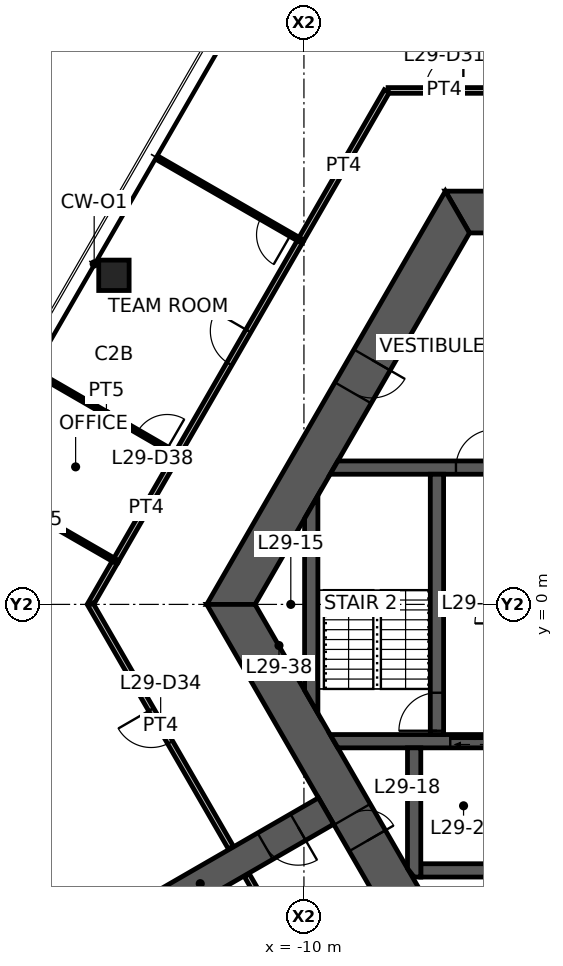
"""IFC4 building model, lengths in metres.
Left out: names, types, materials, properties, quantities, classifications, styles, units other than length and angle.
Written with IfcOpenShell. Run it as: python <this file> out.ifc"""

import sys

from ifc_helpers import new_model, si_unit, direction, frame, frame_2d, origin, origin_2d, place, context, subcontext, project, spatial, polyline, rectangle, hollow_rectangle, outline, extrude, element, fill, save


model = new_model("IFC4")
c1 = context("Model", 3, precision=1e-05, world=origin(), true_north=direction((0.0, 1.0)))
c2 = subcontext(c1, "Body", "Model", "MODEL_VIEW")
j1 = project(units=[si_unit("LENGTHUNIT", "METRE"), si_unit("PLANEANGLEUNIT", "RADIAN")], contexts=[c1])
p1 = place(None, origin())
s1 = spatial("IfcSite", under=j1, at=p1, CompositionType="ELEMENT")
p2 = place(p1, origin())
s2 = spatial("IfcBuilding", under=s1, at=p2, CompositionType="ELEMENT")
p3 = place(p2, frame((0.0, 0.0, 115.8)))
s3 = spatial("IfcBuildingStorey", under=s2, at=p3, CompositionType="ELEMENT", Elevation=115.8)
p4 = place(p3, frame((-15.0, 8.66, 0.0), z_axis=(0.0, 0.0, 1.0), x_axis=(1.0, 0.0, 0.0)))
e1 = element("IfcColumn", 1, at=p4, inside=s3, PredefinedType="COLUMN", context=c2, shape_type="SweptSolid", body=[
    extrude(hollow_rectangle(XDim=0.8, YDim=0.8, WallThickness=0.045, at=origin_2d()), origin(), (0.0, 0.0, 1.0), 3.9),
])
p5 = place(p3, frame((5.961, 10.325, 0.0), z_axis=(0.0, 0.0, 1.0), x_axis=(-1.0, 0.0, 0.0)))
e2 = element("IfcWall", 2, at=p5, inside=s3, PredefinedType="SHEAR", context=c2, shape_type="SweptSolid", body=[
    extrude(outline(polyline([(-0.318, -0.55), (4.599, -0.55), (5.499, -0.55), (6.424, -0.55), (7.323, -0.55), (12.24, -0.55), (11.605, 0.55), (7.323, 0.55), (6.424, 0.55), (5.499, 0.55), (4.599, 0.55), (0.318, 0.55), (-0.318, -0.55)])), origin(), (0.0, 0.0, 1.0), 3.9),
])
p6 = place(p5, frame((6.424, 0.0, 0.0)))
e3 = element("IfcOpeningElement", 3, at=p6, cuts=e2, PredefinedType="OPENING", context=c2, shape_type="SweptSolid", body=[
    extrude(rectangle(XDim=0.9, YDim=2.1, at=frame_2d((0.45, 1.05))), frame((0.0, 0.56, 0.0), z_axis=(0.0, -1.0, 0.0), x_axis=(1.0, 0.0, 0.0)), (0.0, 0.0, 1.0), 1.12),
])
p7 = place(p5, frame((4.599, 0.0, 0.0)))
e4 = element("IfcOpeningElement", 4, at=p7, cuts=e2, PredefinedType="OPENING", context=c2, shape_type="SweptSolid", body=[
    extrude(rectangle(XDim=0.9, YDim=2.1, at=frame_2d((0.45, 1.05))), frame((0.0, 0.56, 0.0), z_axis=(0.0, -1.0, 0.0), x_axis=(1.0, 0.0, 0.0)), (0.0, 0.0, 1.0), 1.12),
])
p8 = place(p3, frame((-5.961, 10.325, 0.0), z_axis=(0.0, 0.0, 1.0), x_axis=(-0.500004296715, -0.866022923061, 0.0)))
e5 = element("IfcWall", 5, at=p8, inside=s3, PredefinedType="SHEAR", context=c2, shape_type="SweptSolid", body=[
    extrude(outline(polyline([(-0.318, -0.55), (4.494, -0.55), (5.494, -0.55), (12.24, -0.55), (11.605, 0.55), (5.494, 0.55), (4.494, 0.55), (0.318, 0.55), (-0.318, -0.55)])), origin(), (0.0, 0.0, 1.0), 3.9),
])
p9 = place(p8, frame((4.494, 0.0, 0.0)))
e6 = element("IfcOpeningElement", 6, at=p9, cuts=e5, PredefinedType="OPENING", context=c2, shape_type="SweptSolid", body=[
    extrude(rectangle(XDim=1.0, YDim=2.1, at=frame_2d((0.5, 1.05))), frame((0.0, 0.56, 0.0), z_axis=(0.0, -1.0, 0.0), x_axis=(1.0, 0.0, 0.0)), (0.0, 0.0, 1.0), 1.12),
])
p10 = place(p3, frame((-11.922, 0.0, 0.0), z_axis=(0.0, 0.0, 1.0), x_axis=(0.500004296715, -0.866022923061, 0.0)))
e7 = element("IfcWall", 7, at=p10, inside=s3, PredefinedType="SHEAR", context=c2, shape_type="SweptSolid", body=[
    extrude(outline(polyline([(-0.318, -0.55), (6.381, -0.55), (7.181, -0.55), (12.24, -0.55), (11.605, 0.55), (7.181, 0.55), (6.381, 0.55), (0.318, 0.55), (-0.318, -0.55)])), origin(), (0.0, 0.0, 1.0), 3.9),
])
p11 = place(p10, frame((6.381, 0.0, 0.0)))
e8 = element("IfcOpeningElement", 8, at=p11, cuts=e7, PredefinedType="OPENING", context=c2, shape_type="SweptSolid", body=[
    extrude(rectangle(XDim=0.8, YDim=2.1, at=frame_2d((0.4, 1.05))), frame((0.0, 0.56, 0.0), z_axis=(0.0, -1.0, 0.0), x_axis=(1.0, 0.0, 0.0)), (0.0, 0.0, 1.0), 1.12),
])
p12 = place(p3, frame((-9.418, -5.438, 0.0), z_axis=(0.0, 0.0, 1.0), x_axis=(-0.866029782078, -0.499992416496, 0.0)))
e9 = element("IfcWall", 9, at=p12, inside=s3, PredefinedType="SHEAR", context=c2, shape_type="SweptSolid", body=[
    extrude(rectangle(XDim=7.646, YDim=0.8, at=frame_2d((3.823, 0.0))), origin(), (0.0, 0.0, 1.0), 3.9),
])
p13 = place(p12, frame((0.85, 0.0, 0.0)))
e10 = element("IfcOpeningElement", 10, at=p13, cuts=e9, PredefinedType="OPENING", context=c2, shape_type="SweptSolid", body=[
    extrude(rectangle(XDim=1.0, YDim=2.1, at=frame_2d((0.5, 1.05))), frame((0.0, 0.41, 0.0), z_axis=(0.0, -1.0, 0.0), x_axis=(1.0, 0.0, 0.0)), (0.0, 0.0, 1.0), 0.82),
])
p14 = place(p3, frame((-9.209, 3.6, 0.0), z_axis=(0.0, 0.0, 1.0), x_axis=(1.0, 0.0, 0.0)))
e11 = element("IfcWall", 11, at=p14, inside=s3, PredefinedType="SHEAR", context=c2, shape_type="SweptSolid", body=[
    extrude(outline(polyline([(-0.101, -0.175), (3.209, -0.175), (4.209, -0.175), (5.609, -0.175), (6.709, -0.175), (7.784, -0.175), (7.784, 0.175), (6.709, 0.175), (5.609, 0.175), (4.209, 0.175), (3.209, 0.175), (0.101, 0.175), (-0.101, -0.175)])), origin(), (0.0, 0.0, 1.0), 3.9),
])
p15 = place(p14, frame((3.209, 0.0, 0.0)))
e12 = element("IfcOpeningElement", 12, at=p15, cuts=e11, PredefinedType="OPENING", context=c2, shape_type="SweptSolid", body=[
    extrude(rectangle(XDim=1.0, YDim=2.1, at=frame_2d((0.5, 1.05))), frame((0.0, 0.185, 0.0), z_axis=(0.0, -1.0, 0.0), x_axis=(1.0, 0.0, 0.0)), (0.0, 0.0, 1.0), 0.37),
])
p16 = place(p14, frame((5.609, 0.0, 0.0)))
e13 = element("IfcOpeningElement", 13, at=p16, cuts=e11, PredefinedType="OPENING", context=c2, shape_type="SweptSolid", body=[
    extrude(rectangle(XDim=1.1, YDim=2.1, at=frame_2d((0.55, 1.05))), frame((0.0, 0.185, 0.0), z_axis=(0.0, -1.0, 0.0), x_axis=(1.0, 0.0, 0.0)), (0.0, 0.0, 1.0), 0.37),
])
p17 = place(p3, frame((-9.209, -3.6, 0.0), z_axis=(0.0, 0.0, 1.0), x_axis=(1.0, 0.0, 0.0)))
e14 = element("IfcWall", 14, at=p17, inside=s3, PredefinedType="SHEAR", context=c2, shape_type="SweptSolid", body=[
    extrude(outline(polyline([(0.101, -0.175), (3.059, -0.175), (4.359, -0.175), (5.609, -0.175), (6.709, -0.175), (7.784, -0.175), (7.784, 0.175), (6.709, 0.175), (5.609, 0.175), (4.359, 0.175), (3.059, 0.175), (-0.101, 0.175), (0.101, -0.175)])), origin(), (0.0, 0.0, 1.0), 3.9),
])
p18 = place(p17, frame((5.609, 0.0, 0.0)))
e15 = element("IfcOpeningElement", 15, at=p18, cuts=e14, PredefinedType="OPENING", context=c2, shape_type="SweptSolid", body=[
    extrude(rectangle(XDim=1.1, YDim=2.1, at=frame_2d((0.55, 1.05))), frame((0.0, 0.185, 0.0), z_axis=(0.0, -1.0, 0.0), x_axis=(1.0, 0.0, 0.0)), (0.0, 0.0, 1.0), 0.37),
])
p19 = place(p17, frame((3.059, 0.0, 0.0)))
e16 = element("IfcOpeningElement", 16, at=p19, cuts=e14, PredefinedType="OPENING", context=c2, shape_type="SweptSolid", body=[
    extrude(rectangle(XDim=1.3, YDim=2.1, at=frame_2d((0.65, 1.05))), frame((0.0, 0.185, 0.0), z_axis=(0.0, -1.0, 0.0), x_axis=(1.0, 0.0, 0.0)), (0.0, 0.0, 1.0), 0.37),
])
p20 = place(p3, frame((-6.5, -3.425, 0.0), z_axis=(0.0, 0.0, 1.0), x_axis=(0.0, 1.0, 0.0)))
e17 = element("IfcWall", 17, at=p20, inside=s3, PredefinedType="SHEAR", context=c2, shape_type="SweptSolid", body=[
    extrude(rectangle(XDim=6.85, YDim=0.35, at=frame_2d((3.425, 0.0))), origin(), (0.0, 0.0, 1.0), 3.9),
])
p21 = place(p20, frame((0.1, 0.0, 0.0)))
e18 = element("IfcOpeningElement", 18, at=p21, cuts=e17, PredefinedType="OPENING", context=c2, shape_type="SweptSolid", body=[
    extrude(rectangle(XDim=1.0, YDim=2.1, at=frame_2d((0.5, 1.05))), frame((0.0, 0.185, 0.0), z_axis=(0.0, -1.0, 0.0), x_axis=(1.0, 0.0, 0.0)), (0.0, 0.0, 1.0), 0.37),
])
p22 = place(p3, frame((-6.925, -7.0, 0.0), z_axis=(0.0, 0.0, 1.0), x_axis=(1.0, 0.0, 0.0)))
e19 = element("IfcWall", 19, at=p22, inside=s3, PredefinedType="SHEAR", context=c2, shape_type="SweptSolid", body=[
    extrude(rectangle(XDim=2.25, YDim=0.35, at=frame_2d((1.125, 0.0))), origin(), (0.0, 0.0, 1.0), 3.9),
])
p23 = place(p3, frame((-7.1, -3.775, 0.0), z_axis=(0.0, 0.0, 1.0), x_axis=(0.0, -1.0, 0.0)))
e20 = element("IfcWall", 20, at=p23, inside=s3, PredefinedType="SHEAR", context=c2, shape_type="SweptSolid", body=[
    extrude(outline(polyline([(0.0, -0.175), (3.175, -0.175), (3.4, 0.0), (3.4, 0.175), (0.0, 0.175), (0.0, -0.175)])), origin(), (0.0, 0.0, 1.0), 3.9),
])
p24 = place(p3, frame((-9.808, -2.562, 0.0), z_axis=(0.0, 0.0, 1.0), x_axis=(0.0, 1.0, 0.0)))
e21 = element("IfcWall", 21, at=p24, inside=s3, PredefinedType="SHEAR", context=c2, shape_type="SweptSolid", body=[
    extrude(outline(polyline([(-0.303, -0.175), (5.428, -0.175), (4.821, 0.175), (0.303, 0.175), (-0.303, -0.175)])), origin(), (0.0, 0.0, 1.0), 3.9),
])
p25 = place(p3, frame((-7.786, 13.525, 0.0), z_axis=(0.0, 0.0, 1.0), x_axis=(1.0, 0.0, 0.0)))
e22 = element("IfcWall", 22, at=p25, inside=s3, PredefinedType="PARTITIONING", context=c2, shape_type="SweptSolid", body=[
    extrude(rectangle(XDim=2.961, YDim=0.15, at=frame_2d((1.48, 0.0))), origin(), (0.0, 0.0, 1.0), 2.95),
])
p26 = place(p25, frame((0.981, 0.0, 0.0)))
e23 = element("IfcOpeningElement", 23, at=p26, cuts=e22, PredefinedType="OPENING", context=c2, shape_type="SweptSolid", body=[
    extrude(rectangle(XDim=1.0, YDim=2.1, at=frame_2d((0.5, 1.05))), frame((0.0, 0.085, 0.0), z_axis=(0.0, -1.0, 0.0), x_axis=(1.0, 0.0, 0.0)), (0.0, 0.0, 1.0), 0.17),
])
p27 = place(p3, frame((-10.092, 9.57, 0.0), z_axis=(0.0, 0.0, 1.0), x_axis=(0.499987549055, 0.866032592222, 0.0)))
e24 = element("IfcWall", 24, at=p27, inside=s3, PredefinedType="PARTITIONING", context=c2, shape_type="SweptSolid", body=[
    extrude(rectangle(XDim=4.544, YDim=0.15, at=frame_2d((2.272, 0.0))), origin(), (0.0, 0.0, 1.0), 2.95),
])
p28 = place(p3, frame((-14.962, 1.135, 0.0), z_axis=(0.0, 0.0, 1.0), x_axis=(0.500001520505, 0.866024525919, 0.0)))
e25 = element("IfcWall", 25, at=p28, inside=s3, PredefinedType="PARTITIONING", context=c2, shape_type="SweptSolid", body=[
    extrude(rectangle(XDim=3.256, YDim=0.15, at=frame_2d((1.628, 0.0))), origin(), (0.0, 0.0, 1.0), 2.95),
])
p29 = place(p3, frame((-15.617, 0.0, 0.0), z_axis=(0.0, 0.0, 1.0), x_axis=(0.499898558967, 0.866083962871, 0.0)))
e26 = element("IfcWall", 26, at=p29, inside=s3, PredefinedType="PARTITIONING", context=c2, shape_type="SweptSolid", body=[
    extrude(rectangle(XDim=1.32, YDim=0.15, at=frame_2d((0.66, 0.0))), origin(), (0.0, 0.0, 1.0), 2.95),
])
p30 = place(p3, frame((-11.923, -6.399, 0.0), z_axis=(0.0, 0.0, 1.0), x_axis=(-0.499980837837, 0.866036466782, 0.0)))
e27 = element("IfcWall", 27, at=p30, inside=s3, PredefinedType="PARTITIONING", context=c2, shape_type="SweptSolid", body=[
    extrude(rectangle(XDim=7.388, YDim=0.15, at=frame_2d((3.694, 0.0))), origin(), (0.0, 0.0, 1.0), 2.95),
])
p31 = place(p30, frame((3.194, 0.0, 0.0)))
e28 = element("IfcOpeningElement", 28, at=p31, cuts=e27, PredefinedType="OPENING", context=c2, shape_type="SweptSolid", body=[
    extrude(rectangle(XDim=1.0, YDim=2.1, at=frame_2d((0.5, 1.05))), frame((0.0, 0.085, 0.0), z_axis=(0.0, -1.0, 0.0), x_axis=(1.0, 0.0, 0.0)), (0.0, 0.0, 1.0), 0.17),
])
p32 = place(p3, frame((-13.338, 3.947, 0.0), z_axis=(0.0, 0.0, 1.0), x_axis=(0.49998791073, 0.866032383415, 0.0)))
e29 = element("IfcWall", 29, at=p32, inside=s3, PredefinedType="PARTITIONING", context=c2, shape_type="SweptSolid", body=[
    extrude(rectangle(XDim=6.502, YDim=0.15, at=frame_2d((3.251, 0.0))), origin(), (0.0, 0.0, 1.0), 2.95),
])
p33 = place(p32, frame((2.751, 0.0, 0.0)))
e30 = element("IfcOpeningElement", 30, at=p33, cuts=e29, PredefinedType="OPENING", context=c2, shape_type="SweptSolid", body=[
    extrude(rectangle(XDim=1.0, YDim=2.1, at=frame_2d((0.5, 1.05))), frame((0.0, 0.085, 0.0), z_axis=(0.0, -1.0, 0.0), x_axis=(1.0, 0.0, 0.0)), (0.0, 0.0, 1.0), 0.17),
])
p34 = place(p3, frame((-10.088, 9.578, 0.0), z_axis=(0.0, 0.0, 1.0), x_axis=(-0.866555067673, 0.499081470994, 0.0)))
e31 = element("IfcWall", 31, at=p34, inside=s3, PredefinedType="PARTITIONING", context=c2, shape_type="SweptSolid", body=[
    extrude(rectangle(XDim=4.321, YDim=0.1, at=frame_2d((2.16, 0.0))), origin(), (0.0, 0.0, 1.0), 2.95),
])
p35 = place(p34, frame((0.3, 0.0, 0.0)))
e32 = element("IfcOpeningElement", 32, at=p35, cuts=e31, PredefinedType="OPENING", context=c2, shape_type="SweptSolid", body=[
    extrude(rectangle(XDim=0.9, YDim=2.1, at=frame_2d((0.45, 1.05))), frame((0.0, 0.06, 0.0), z_axis=(0.0, -1.0, 0.0), x_axis=(1.0, 0.0, 0.0)), (0.0, 0.0, 1.0), 0.12),
])
p36 = place(p3, frame((-14.957, 1.143, 0.0), z_axis=(0.0, 0.0, 1.0), x_axis=(-0.86652666665, 0.499130780441, 0.0)))
e33 = element("IfcWall", 33, at=p36, inside=s3, PredefinedType="PARTITIONING", context=c2, shape_type="SweptSolid", body=[
    extrude(rectangle(XDim=4.275, YDim=0.1, at=frame_2d((2.138, 0.0))), origin(), (0.0, 0.0, 1.0), 2.95),
])
p37 = place(p3, frame((-17.056, 6.099, 0.0), z_axis=(0.0, 0.0, 1.0), x_axis=(0.865505397626, -0.500899597405, 0.0)))
e34 = element("IfcWall", 34, at=p37, inside=s3, PredefinedType="PARTITIONING", context=c2, shape_type="SweptSolid", body=[
    extrude(rectangle(XDim=4.295, YDim=0.1, at=frame_2d((2.148, 0.0))), origin(), (0.0, 0.0, 1.0), 2.95),
])
p38 = place(p37, frame((3.095, 0.0, 0.0)))
e35 = element("IfcOpeningElement", 35, at=p38, cuts=e34, PredefinedType="OPENING", context=c2, shape_type="SweptSolid", body=[
    extrude(rectangle(XDim=0.9, YDim=2.1, at=frame_2d((0.45, 1.05))), frame((0.0, 0.06, 0.0), z_axis=(0.0, -1.0, 0.0), x_axis=(1.0, 0.0, 0.0)), (0.0, 0.0, 1.0), 0.12),
])
p39 = place(p3, frame((-10.911, -8.152, 0.0), z_axis=(0.0, 0.0, 1.0), x_axis=(-0.499841408252, 0.866116947413, 0.0)))
e36 = element("IfcWall", 36, at=p39, inside=s3, PredefinedType="PARTITIONING", context=c2, shape_type="SweptSolid", body=[
    extrude(rectangle(XDim=1.185, YDim=0.15, at=frame_2d((0.592, 0.0))), origin(), (0.0, 0.0, 1.0), 2.95),
])
p40 = place(p11, origin())
e37 = element("IfcDoor", 37, at=p40, inside=s3, OperationType="SINGLE_SWING_RIGHT", PredefinedType="DOOR", context=c2, shape_type="SweptSolid", body=[
    extrude(rectangle(XDim=0.8, YDim=2.1, at=frame_2d((0.4, 1.05))), frame((0.0, 0.025, 0.0), z_axis=(0.0, -1.0, 0.0), x_axis=(1.0, 0.0, 0.0)), (0.0, 0.0, 1.0), 0.05),
])
fill(e8, e37)
p41 = place(p9, origin())
e38 = element("IfcDoor", 38, at=p41, inside=s3, OperationType="SINGLE_SWING_LEFT", PredefinedType="DOOR", context=c2, shape_type="SweptSolid", body=[
    extrude(rectangle(XDim=1.0, YDim=2.1, at=frame_2d((0.5, 1.05))), frame((0.0, 0.025, 0.0), z_axis=(0.0, -1.0, 0.0), x_axis=(1.0, 0.0, 0.0)), (0.0, 0.0, 1.0), 0.05),
])
fill(e6, e38)
p42 = place(p21, origin())
e39 = element("IfcDoor", 39, at=p42, inside=s3, OperationType="SINGLE_SWING_LEFT", PredefinedType="DOOR", context=c2, shape_type="SweptSolid", body=[
    extrude(rectangle(XDim=1.0, YDim=2.1, at=frame_2d((0.5, 1.05))), frame((0.0, 0.025, 0.0), z_axis=(0.0, -1.0, 0.0), x_axis=(1.0, 0.0, 0.0)), (0.0, 0.0, 1.0), 0.05),
])
fill(e18, e39)
p43 = place(p15, origin())
e40 = element("IfcDoor", 40, at=p43, inside=s3, OperationType="SINGLE_SWING_RIGHT", PredefinedType="DOOR", context=c2, shape_type="SweptSolid", body=[
    extrude(rectangle(XDim=1.0, YDim=2.1, at=frame_2d((0.5, 1.05))), frame((0.0, 0.025, 0.0), z_axis=(0.0, -1.0, 0.0), x_axis=(1.0, 0.0, 0.0)), (0.0, 0.0, 1.0), 0.05),
])
fill(e12, e40)
p44 = place(p13, origin())
e41 = element("IfcDoor", 41, at=p44, inside=s3, OperationType="SINGLE_SWING_LEFT", PredefinedType="DOOR", context=c2, shape_type="SweptSolid", body=[
    extrude(rectangle(XDim=1.0, YDim=2.1, at=frame_2d((0.5, 1.05))), frame((0.0, 0.025, 0.0), z_axis=(0.0, -1.0, 0.0), x_axis=(1.0, 0.0, 0.0)), (0.0, 0.0, 1.0), 0.05),
])
fill(e10, e41)
p45 = place(p26, origin())
e42 = element("IfcDoor", 42, at=p45, inside=s3, OperationType="SINGLE_SWING_RIGHT", PredefinedType="DOOR", context=c2, shape_type="SweptSolid", body=[
    extrude(rectangle(XDim=1.0, YDim=2.1, at=frame_2d((0.5, 1.05))), frame((0.0, 0.025, 0.0), z_axis=(0.0, -1.0, 0.0), x_axis=(1.0, 0.0, 0.0)), (0.0, 0.0, 1.0), 0.05),
])
fill(e23, e42)
p46 = place(p31, origin())
e43 = element("IfcDoor", 43, at=p46, inside=s3, OperationType="SINGLE_SWING_RIGHT", PredefinedType="DOOR", context=c2, shape_type="SweptSolid", body=[
    extrude(rectangle(XDim=1.0, YDim=2.1, at=frame_2d((0.5, 1.05))), frame((0.0, 0.025, 0.0), z_axis=(0.0, -1.0, 0.0), x_axis=(1.0, 0.0, 0.0)), (0.0, 0.0, 1.0), 0.05),
])
fill(e28, e43)
p47 = place(p33, origin())
e44 = element("IfcDoor", 44, at=p47, inside=s3, OperationType="SINGLE_SWING_RIGHT", PredefinedType="DOOR", context=c2, shape_type="SweptSolid", body=[
    extrude(rectangle(XDim=1.0, YDim=2.1, at=frame_2d((0.5, 1.05))), frame((0.0, 0.025, 0.0), z_axis=(0.0, -1.0, 0.0), x_axis=(1.0, 0.0, 0.0)), (0.0, 0.0, 1.0), 0.05),
])
fill(e30, e44)
p48 = place(p35, origin())
e45 = element("IfcDoor", 45, at=p48, inside=s3, OperationType="SINGLE_SWING_LEFT", PredefinedType="DOOR", context=c2, shape_type="SweptSolid", body=[
    extrude(rectangle(XDim=0.9, YDim=2.1, at=frame_2d((0.45, 1.05))), frame((0.0, 0.025, 0.0), z_axis=(0.0, -1.0, 0.0), x_axis=(1.0, 0.0, 0.0)), (0.0, 0.0, 1.0), 0.05),
])
fill(e32, e45)
p49 = place(p38, origin())
e46 = element("IfcDoor", 46, at=p49, inside=s3, OperationType="SINGLE_SWING_RIGHT", PredefinedType="DOOR", context=c2, shape_type="SweptSolid", body=[
    extrude(rectangle(XDim=0.9, YDim=2.1, at=frame_2d((0.45, 1.05))), frame((0.0, 0.025, 0.0), z_axis=(0.0, -1.0, 0.0), x_axis=(1.0, 0.0, 0.0)), (0.0, 0.0, 1.0), 0.05),
])
fill(e35, e46)
p50 = place(p19, origin())
e47 = element("IfcDoor", 47, at=p50, inside=s3, OperationType="DOUBLE_DOOR_SLIDING", PredefinedType="DOOR", context=c2, shape_type="SweptSolid", body=[
    extrude(rectangle(XDim=1.3, YDim=2.1, at=frame_2d((0.65, 1.05))), frame((0.0, 0.025, 0.0), z_axis=(0.0, -1.0, 0.0), x_axis=(1.0, 0.0, 0.0)), (0.0, 0.0, 1.0), 0.05),
])
fill(e16, e47)
save(model, sys.argv[1])
